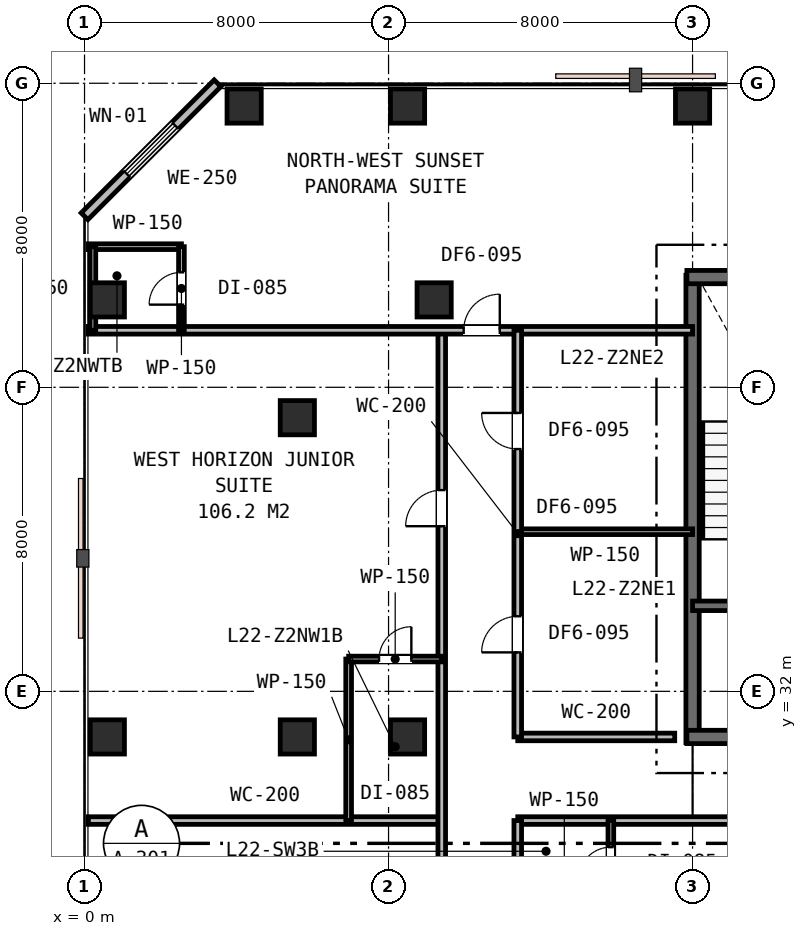
"""IFC4 building model, lengths in metres.
Left out: names, types, materials, properties, quantities, classifications, styles, units other than length and angle.
Written with IfcOpenShell. Run it as: python <this file> out.ifc"""

import sys

from ifc_helpers import new_model, si_unit, direction, frame, frame_2d, origin, origin_2d, place, context, subcontext, project, spatial, rectangle, extrude, element, fill, save


model = new_model("IFC4")
c1 = context("Model", 3, precision=1e-05, world=origin(), true_north=direction((0.0, 1.0)))
c2 = subcontext(c1, "Body", "Model", "MODEL_VIEW")
j1 = project(units=[si_unit("LENGTHUNIT", "METRE"), si_unit("PLANEANGLEUNIT", "RADIAN")], contexts=[c1])
p1 = place(None, origin())
s1 = spatial("IfcSite", under=j1, at=p1, CompositionType="ELEMENT")
p2 = place(p1, origin())
s2 = spatial("IfcBuilding", under=s1, at=p2, CompositionType="ELEMENT")
p3 = place(p2, frame((0.0, 0.0, 90.0)))
s3 = spatial("IfcBuildingStorey", under=s2, at=p3, CompositionType="ELEMENT", Elevation=90.0)
p4 = place(p3, frame((16.0, 30.65, 0.0), z_axis=(0.0, 0.0, 1.0), x_axis=(0.0, 1.0, 0.0)))
e1 = element("IfcWall", 1, at=p4, inside=s3, PredefinedType="SHEAR", context=c2, shape_type="SweptSolid", body=[
    extrude(rectangle(XDim=12.3, YDim=0.35, at=frame_2d((6.15, 0.0))), origin(), (0.0, 0.0, 1.0), 3.6),
])
p5 = place(p3, frame((15.85, 42.9, 0.0), z_axis=(0.0, 0.0, 1.0), x_axis=(1.0, 0.0, 0.0)))
e2 = element("IfcWall", 2, at=p5, inside=s3, PredefinedType="SHEAR", context=c2, shape_type="SweptSolid", body=[
    extrude(rectangle(XDim=24.3, YDim=0.35, at=frame_2d((12.15, 0.0))), origin(), (0.0, 0.0, 1.0), 3.6),
])
p6 = place(p3, frame((15.85, 30.8, 0.0), z_axis=(0.0, 0.0, 1.0), x_axis=(1.0, 0.0, 0.0)))
e3 = element("IfcWall", 3, at=p6, inside=s3, PredefinedType="SHEAR", context=c2, shape_type="SweptSolid", body=[
    extrude(rectangle(XDim=11.2, YDim=0.35, at=frame_2d((5.6, 0.0))), origin(), (0.0, 0.0, 1.0), 3.6),
])
p7 = place(p6, frame((2.45, 0.0, 0.0)))
e4 = element("IfcOpeningElement", 4, at=p7, cuts=e3, PredefinedType="OPENING", context=c2, shape_type="SweptSolid", body=[
    extrude(rectangle(XDim=1.1, YDim=2.15, at=frame_2d((0.55, 1.075))), frame((0.0, 0.185, 0.0), z_axis=(0.0, -1.0, 0.0), x_axis=(1.0, 0.0, 0.0)), (0.0, 0.0, 1.0), 0.37),
])
p8 = place(p3, frame((16.0, 34.25, 0.0), z_axis=(0.0, 0.0, 1.0), x_axis=(1.0, 0.0, 0.0)))
e5 = element("IfcWall", 5, at=p8, inside=s3, PredefinedType="SHEAR", context=c2, shape_type="SweptSolid", body=[
    extrude(rectangle(XDim=6.05, YDim=0.25, at=frame_2d((3.025, 0.0))), origin(), (0.0, 0.0, 1.0), 3.6),
])
p9 = place(p8, frame((1.25, 0.0, 0.0)))
e6 = element("IfcOpeningElement", 6, at=p9, cuts=e5, PredefinedType="OPENING", context=c2, shape_type="SweptSolid", body=[
    extrude(rectangle(XDim=1.0, YDim=2.15, at=frame_2d((0.5, 1.075))), frame((0.0, 0.135, 0.0), z_axis=(0.0, -1.0, 0.0), x_axis=(1.0, 0.0, 0.0)), (0.0, 0.0, 1.0), 0.27),
])
p10 = place(p8, frame((4.2, 0.0, 0.0)))
e7 = element("IfcOpeningElement", 7, at=p10, cuts=e5, PredefinedType="OPENING", context=c2, shape_type="SweptSolid", body=[
    extrude(rectangle(XDim=1.1, YDim=2.15, at=frame_2d((0.55, 1.075))), frame((0.0, 0.135, 0.0), z_axis=(0.0, -1.0, 0.0), x_axis=(1.0, 0.0, 0.0)), (0.0, 0.0, 1.0), 0.27),
])
for number, where, z_axis, x_axis in (
    (8, (5.6, 30.8, 0.0), (0.0, 0.0, 1.0), (1.0, 0.0, 0.0)),
    (9, (5.6, 39.2, 0.0), (0.0, 0.0, 1.0), (1.0, 0.0, 0.0)),
    (10, (8.5, 30.8, 0.0), (0.0, 0.0, 1.0), (1.0, 0.0, 0.0)),
    (11, (9.2, 42.3, 0.0), (0.0, 0.0, 1.0), (1.0, 0.0, 0.0)),
    (12, (0.6, 30.8, 0.0), (0.0, 0.0, 1.0), (1.0, 0.0, 0.0)),
    (13, (0.6, 42.3, 0.0), (0.0, 0.0, 1.0), (1.0, 0.0, 0.0)),
    (14, (4.2, 47.4, 0.0), (0.0, 0.0, 1.0), (1.0, 0.0, 0.0)),
    (15, (8.5, 47.4, 0.0), (0.0, 0.0, 1.0), (1.0, 0.0, 0.0)),
    (16, (16.0, 47.4, 0.0), (0.0, 0.0, 1.0), (1.0, 0.0, 0.0)),
):
    element("IfcColumn", number, at=place(p3, frame(where, z_axis=z_axis, x_axis=x_axis)), inside=s3, PredefinedType="COLUMN", context=c2, shape_type="SweptSolid", body=[
        extrude(rectangle(XDim=0.9, YDim=0.9, at=origin_2d()), origin(), (0.0, 0.0, 1.0), 3.6),
    ])
p11 = place(p3, frame((3.5, 48.0, 0.0), z_axis=(0.0, 0.0, 1.0), x_axis=(-0.707106781187, -0.707106781187, 0.0)))
e17 = element("IfcWall", 17, at=p11, inside=s3, PredefinedType="STANDARD", context=c2, shape_type="SweptSolid", body=[
    extrude(rectangle(XDim=4.95, YDim=0.25, at=frame_2d((2.475, 0.0))), origin(), (0.0, 0.0, 1.0), 3.33),
])
p12 = place(p11, frame((1.575, 0.0, 0.75)))
e18 = element("IfcOpeningElement", 18, at=p12, cuts=e17, PredefinedType="OPENING", context=c2, shape_type="SweptSolid", body=[
    extrude(rectangle(XDim=1.8, YDim=1.85, at=frame_2d((0.9, 0.925))), frame((0.0, 0.135, 0.0), z_axis=(0.0, -1.0, 0.0), x_axis=(1.0, 0.0, 0.0)), (0.0, 0.0, 1.0), 0.27),
])
p13 = place(p3, frame((0.1, 28.6, 0.0), z_axis=(0.0, 0.0, 1.0), x_axis=(1.0, 0.0, 0.0)))
e19 = element("IfcWall", 19, at=p13, inside=s3, PredefinedType="PARTITIONING", context=c2, shape_type="SweptSolid", body=[
    extrude(rectangle(XDim=9.3, YDim=0.2, at=frame_2d((4.65, 0.0))), origin(), (0.0, 0.0, 1.0), 2.83),
])
p14 = place(p3, frame((11.4, 28.6, 0.0), z_axis=(0.0, 0.0, 1.0), x_axis=(1.0, 0.0, 0.0)))
e20 = element("IfcWall", 20, at=p14, inside=s3, PredefinedType="PARTITIONING", context=c2, shape_type="SweptSolid", body=[
    extrude(rectangle(XDim=32.8, YDim=0.2, at=frame_2d((16.4, 0.0))), origin(), (0.0, 0.0, 1.0), 2.83),
])
p15 = place(p14, frame((14.7, 0.0, 0.0)))
e21 = element("IfcOpeningElement", 21, at=p15, cuts=e20, PredefinedType="OPENING", context=c2, shape_type="SweptSolid", body=[
    extrude(rectangle(XDim=0.95, YDim=2.15, at=frame_2d((0.475, 1.075))), frame((0.0, 0.11, 0.0), z_axis=(0.0, -1.0, 0.0), x_axis=(1.0, 0.0, 0.0)), (0.0, 0.0, 1.0), 0.22),
])
p16 = place(p14, frame((22.475, 0.0, 0.0)))
e22 = element("IfcOpeningElement", 22, at=p16, cuts=e20, PredefinedType="OPENING", context=c2, shape_type="SweptSolid", body=[
    extrude(rectangle(XDim=0.95, YDim=2.15, at=frame_2d((0.475, 1.075))), frame((0.0, 0.11, 0.0), z_axis=(0.0, -1.0, 0.0), x_axis=(1.0, 0.0, 0.0)), (0.0, 0.0, 1.0), 0.22),
])
p17 = place(p14, frame((28.985, 0.0, 0.0)))
e23 = element("IfcOpeningElement", 23, at=p17, cuts=e20, PredefinedType="OPENING", context=c2, shape_type="SweptSolid", body=[
    extrude(rectangle(XDim=0.95, YDim=2.15, at=frame_2d((0.475, 1.075))), frame((0.0, 0.11, 0.0), z_axis=(0.0, -1.0, 0.0), x_axis=(1.0, 0.0, 0.0)), (0.0, 0.0, 1.0), 0.22),
])
p18 = place(p3, frame((11.4, 30.8, 0.0), z_axis=(0.0, 0.0, 1.0), x_axis=(1.0, 0.0, 0.0)))
e24 = element("IfcWall", 24, at=p18, inside=s3, PredefinedType="PARTITIONING", context=c2, shape_type="SweptSolid", body=[
    extrude(rectangle(XDim=4.13, YDim=0.2, at=frame_2d((2.065, 0.0))), origin(), (0.0, 0.0, 1.0), 2.83),
])
p19 = place(p3, frame((9.4, 10.6, 0.0), z_axis=(0.0, 0.0, 1.0), x_axis=(0.0, 1.0, 0.0)))
e25 = element("IfcWall", 25, at=p19, inside=s3, PredefinedType="PARTITIONING", context=c2, shape_type="SweptSolid", body=[
    extrude(rectangle(XDim=30.9, YDim=0.2, at=frame_2d((15.45, 0.0))), origin(), (0.0, 0.0, 1.0), 2.83),
])
p20 = place(p19, frame((8.679, 0.0, 0.0)))
e26 = element("IfcOpeningElement", 26, at=p20, cuts=e25, PredefinedType="OPENING", context=c2, shape_type="SweptSolid", body=[
    extrude(rectangle(XDim=0.95, YDim=2.15, at=frame_2d((0.475, 1.075))), frame((0.0, 0.11, 0.0), z_axis=(0.0, -1.0, 0.0), x_axis=(1.0, 0.0, 0.0)), (0.0, 0.0, 1.0), 0.22),
])
p21 = place(p19, frame((14.68, 0.0, 0.0)))
e27 = element("IfcOpeningElement", 27, at=p21, cuts=e25, PredefinedType="OPENING", context=c2, shape_type="SweptSolid", body=[
    extrude(rectangle(XDim=0.95, YDim=2.15, at=frame_2d((0.475, 1.075))), frame((0.0, 0.11, 0.0), z_axis=(0.0, -1.0, 0.0), x_axis=(1.0, 0.0, 0.0)), (0.0, 0.0, 1.0), 0.22),
])
p22 = place(p19, frame((4.273, 0.0, 0.0)))
e28 = element("IfcOpeningElement", 28, at=p22, cuts=e25, PredefinedType="OPENING", context=c2, shape_type="SweptSolid", body=[
    extrude(rectangle(XDim=0.95, YDim=2.15, at=frame_2d((0.475, 1.075))), frame((0.0, 0.11, 0.0), z_axis=(0.0, -1.0, 0.0), x_axis=(1.0, 0.0, 0.0)), (0.0, 0.0, 1.0), 0.22),
])
p23 = place(p19, frame((25.745, 0.0, 0.0)))
e29 = element("IfcOpeningElement", 29, at=p23, cuts=e25, PredefinedType="OPENING", context=c2, shape_type="SweptSolid", body=[
    extrude(rectangle(XDim=0.95, YDim=2.15, at=frame_2d((0.475, 1.075))), frame((0.0, 0.11, 0.0), z_axis=(0.0, -1.0, 0.0), x_axis=(1.0, 0.0, 0.0)), (0.0, 0.0, 1.0), 0.22),
])
p24 = place(p3, frame((0.1, 41.5, 0.0), z_axis=(0.0, 0.0, 1.0), x_axis=(1.0, 0.0, 0.0)))
e30 = element("IfcWall", 30, at=p24, inside=s3, PredefinedType="PARTITIONING", context=c2, shape_type="SweptSolid", body=[
    extrude(rectangle(XDim=15.9, YDim=0.2, at=frame_2d((7.95, 0.0))), origin(), (0.0, 0.0, 1.0), 2.83),
])
p25 = place(p24, frame((9.877, 0.0, 0.0)))
e31 = element("IfcOpeningElement", 31, at=p25, cuts=e30, PredefinedType="OPENING", context=c2, shape_type="SweptSolid", body=[
    extrude(rectangle(XDim=0.95, YDim=2.15, at=frame_2d((0.475, 1.075))), frame((0.0, 0.11, 0.0), z_axis=(0.0, -1.0, 0.0), x_axis=(1.0, 0.0, 0.0)), (0.0, 0.0, 1.0), 0.22),
])
p26 = place(p3, frame((0.1, 43.7, 0.0), z_axis=(0.0, 0.0, 1.0), x_axis=(1.0, 0.0, 0.0)))
e32 = element("IfcWall", 32, at=p26, inside=s3, PredefinedType="PARTITIONING", context=c2, shape_type="SweptSolid", body=[
    extrude(rectangle(XDim=2.45, YDim=0.15, at=frame_2d((1.225, 0.0))), origin(), (0.0, 0.0, 1.0), 3.33),
])
p27 = place(p3, frame((2.55, 41.5, 0.0), z_axis=(0.0, 0.0, 1.0), x_axis=(0.0, 1.0, 0.0)))
e33 = element("IfcWall", 33, at=p27, inside=s3, PredefinedType="PARTITIONING", context=c2, shape_type="SweptSolid", body=[
    extrude(rectangle(XDim=2.2, YDim=0.15, at=frame_2d((1.1, 0.0))), origin(), (0.0, 0.0, 1.0), 2.83),
])
p28 = place(p27, frame((0.675, 0.0, 0.0)))
e34 = element("IfcOpeningElement", 34, at=p28, cuts=e33, PredefinedType="OPENING", context=c2, shape_type="SweptSolid", body=[
    extrude(rectangle(XDim=0.85, YDim=2.15, at=frame_2d((0.425, 1.075))), frame((0.0, 0.085, 0.0), z_axis=(0.0, -1.0, 0.0), x_axis=(1.0, 0.0, 0.0)), (0.0, 0.0, 1.0), 0.17),
])
p29 = place(p3, frame((0.22, 41.5, 0.0), z_axis=(0.0, 0.0, 1.0), x_axis=(0.0, 1.0, 0.0)))
e35 = element("IfcWall", 35, at=p29, inside=s3, PredefinedType="PARTITIONING", context=c2, shape_type="SweptSolid", body=[
    extrude(rectangle(XDim=2.2, YDim=0.15, at=frame_2d((1.1, 0.0))), origin(), (0.0, 0.0, 1.0), 2.83),
])
p30 = place(p3, frame((6.95, 28.6, 0.0), z_axis=(0.0, 0.0, 1.0), x_axis=(0.0, 1.0, 0.0)))
e36 = element("IfcWall", 36, at=p30, inside=s3, PredefinedType="PARTITIONING", context=c2, shape_type="SweptSolid", body=[
    extrude(rectangle(XDim=4.25, YDim=0.15, at=frame_2d((2.125, 0.0))), origin(), (0.0, 0.0, 1.0), 2.83),
])
p31 = place(p3, frame((6.95, 32.85, 0.0), z_axis=(0.0, 0.0, 1.0), x_axis=(1.0, 0.0, 0.0)))
e37 = element("IfcWall", 37, at=p31, inside=s3, PredefinedType="PARTITIONING", context=c2, shape_type="SweptSolid", body=[
    extrude(rectangle(XDim=2.45, YDim=0.15, at=frame_2d((1.225, 0.0))), origin(), (0.0, 0.0, 1.0), 2.83),
])
p32 = place(p31, frame((0.8, 0.0, 0.0)))
e38 = element("IfcOpeningElement", 38, at=p32, cuts=e37, PredefinedType="OPENING", context=c2, shape_type="SweptSolid", body=[
    extrude(rectangle(XDim=0.85, YDim=2.15, at=frame_2d((0.425, 1.075))), frame((0.0, 0.085, 0.0), z_axis=(0.0, -1.0, 0.0), x_axis=(1.0, 0.0, 0.0)), (0.0, 0.0, 1.0), 0.17),
])
p33 = place(p3, frame((11.4, 36.2, 0.0), z_axis=(0.0, 0.0, 1.0), x_axis=(1.0, 0.0, 0.0)))
e39 = element("IfcWall", 39, at=p33, inside=s3, PredefinedType="PARTITIONING", context=c2, shape_type="SweptSolid", body=[
    extrude(rectangle(XDim=4.6, YDim=0.15, at=frame_2d((2.3, 0.0))), origin(), (0.0, 0.0, 1.0), 3.33),
])
p34 = place(p3, frame((11.4, 30.8, 0.0), z_axis=(0.0, 0.0, 1.0), x_axis=(0.0, 1.0, 0.0)))
e40 = element("IfcWall", 40, at=p34, inside=s3, PredefinedType="PARTITIONING", context=c2, shape_type="SweptSolid", body=[
    extrude(rectangle(XDim=10.7, YDim=0.2, at=frame_2d((5.35, 0.0))), origin(), (0.0, 0.0, 1.0), 2.83),
])
p35 = place(p34, frame((2.225, 0.0, 0.0)))
e41 = element("IfcOpeningElement", 41, at=p35, cuts=e40, PredefinedType="OPENING", context=c2, shape_type="SweptSolid", body=[
    extrude(rectangle(XDim=0.95, YDim=2.15, at=frame_2d((0.475, 1.075))), frame((0.0, 0.11, 0.0), z_axis=(0.0, -1.0, 0.0), x_axis=(1.0, 0.0, 0.0)), (0.0, 0.0, 1.0), 0.22),
])
p36 = place(p34, frame((7.575, 0.0, 0.0)))
e42 = element("IfcOpeningElement", 42, at=p36, cuts=e40, PredefinedType="OPENING", context=c2, shape_type="SweptSolid", body=[
    extrude(rectangle(XDim=0.95, YDim=2.15, at=frame_2d((0.475, 1.075))), frame((0.0, 0.11, 0.0), z_axis=(0.0, -1.0, 0.0), x_axis=(1.0, 0.0, 0.0)), (0.0, 0.0, 1.0), 0.22),
])
p37 = place(p3, frame((11.4, 10.6, 0.0), z_axis=(0.0, 0.0, 1.0), x_axis=(0.0, 1.0, 0.0)))
e43 = element("IfcWall", 43, at=p37, inside=s3, PredefinedType="PARTITIONING", context=c2, shape_type="SweptSolid", body=[
    extrude(rectangle(XDim=18.0, YDim=0.2, at=frame_2d((9.0, 0.0))), origin(), (0.0, 0.0, 1.0), 2.83),
])
p38 = place(p37, frame((1.29, 0.0, 0.0)))
e44 = element("IfcOpeningElement", 44, at=p38, cuts=e43, PredefinedType="OPENING", context=c2, shape_type="SweptSolid", body=[
    extrude(rectangle(XDim=0.95, YDim=2.15, at=frame_2d((0.475, 1.075))), frame((0.0, 0.11, 0.0), z_axis=(0.0, -1.0, 0.0), x_axis=(1.0, 0.0, 0.0)), (0.0, 0.0, 1.0), 0.22),
])
p39 = place(p37, frame((7.29, 0.0, 0.0)))
e45 = element("IfcOpeningElement", 45, at=p39, cuts=e43, PredefinedType="OPENING", context=c2, shape_type="SweptSolid", body=[
    extrude(rectangle(XDim=0.95, YDim=2.15, at=frame_2d((0.475, 1.075))), frame((0.0, 0.11, 0.0), z_axis=(0.0, -1.0, 0.0), x_axis=(1.0, 0.0, 0.0)), (0.0, 0.0, 1.0), 0.22),
])
p40 = place(p37, frame((13.29, 0.0, 0.0)))
e46 = element("IfcOpeningElement", 46, at=p40, cuts=e43, PredefinedType="OPENING", context=c2, shape_type="SweptSolid", body=[
    extrude(rectangle(XDim=0.95, YDim=2.15, at=frame_2d((0.475, 1.075))), frame((0.0, 0.11, 0.0), z_axis=(0.0, -1.0, 0.0), x_axis=(1.0, 0.0, 0.0)), (0.0, 0.0, 1.0), 0.22),
])
p41 = place(p3, frame((13.85, 26.35, 0.0), z_axis=(0.0, 0.0, 1.0), x_axis=(0.0, 1.0, 0.0)))
e47 = element("IfcWall", 47, at=p41, inside=s3, PredefinedType="PARTITIONING", context=c2, shape_type="SweptSolid", body=[
    extrude(rectangle(XDim=2.25, YDim=0.15, at=frame_2d((1.125, 0.0))), origin(), (0.0, 0.0, 1.0), 3.33),
])
p42 = place(p41, frame((0.7, 0.0, 0.0)))
e48 = element("IfcOpeningElement", 48, at=p42, cuts=e47, PredefinedType="OPENING", context=c2, shape_type="SweptSolid", body=[
    extrude(rectangle(XDim=0.85, YDim=2.15, at=frame_2d((0.425, 1.075))), frame((0.0, 0.085, 0.0), z_axis=(0.0, -1.0, 0.0), x_axis=(1.0, 0.0, 0.0)), (0.0, 0.0, 1.0), 0.17),
])
p43 = place(p12, origin())
e49 = element("IfcWindow", 49, at=p43, inside=s3, PartitioningType="SINGLE_PANEL", PredefinedType="WINDOW", context=c2, shape_type="SweptSolid", body=[
    extrude(rectangle(XDim=1.8, YDim=1.85, at=frame_2d((0.9, 0.925))), frame((0.0, 0.03, 0.0), z_axis=(0.0, -1.0, 0.0), x_axis=(1.0, 0.0, 0.0)), (0.0, 0.0, 1.0), 0.06),
])
fill(e18, e49)
p44 = place(p25, origin())
e50 = element("IfcDoor", 50, at=p44, inside=s3, OperationType="SINGLE_SWING_RIGHT", PredefinedType="DOOR", context=c2, shape_type="SweptSolid", body=[
    extrude(rectangle(XDim=0.95, YDim=2.15, at=frame_2d((0.475, 1.075))), frame((0.0, 0.025, 0.0), z_axis=(0.0, -1.0, 0.0), x_axis=(1.0, 0.0, 0.0)), (0.0, 0.0, 1.0), 0.05),
])
fill(e31, e50)
p45 = place(p28, origin())
e51 = element("IfcDoor", 51, at=p45, inside=s3, OperationType="SINGLE_SWING_LEFT", PredefinedType="DOOR", context=c2, shape_type="SweptSolid", body=[
    extrude(rectangle(XDim=0.85, YDim=2.15, at=frame_2d((0.425, 1.075))), frame((0.0, 0.025, 0.0), z_axis=(0.0, -1.0, 0.0), x_axis=(1.0, 0.0, 0.0)), (0.0, 0.0, 1.0), 0.05),
])
fill(e34, e51)
p46 = place(p23, origin())
e52 = element("IfcDoor", 52, at=p46, inside=s3, OperationType="SINGLE_SWING_LEFT", PredefinedType="DOOR", context=c2, shape_type="SweptSolid", body=[
    extrude(rectangle(XDim=0.95, YDim=2.15, at=frame_2d((0.475, 1.075))), frame((0.0, 0.025, 0.0), z_axis=(0.0, -1.0, 0.0), x_axis=(1.0, 0.0, 0.0)), (0.0, 0.0, 1.0), 0.05),
])
fill(e29, e52)
p47 = place(p32, origin())
e53 = element("IfcDoor", 53, at=p47, inside=s3, OperationType="SINGLE_SWING_RIGHT", PredefinedType="DOOR", context=c2, shape_type="SweptSolid", body=[
    extrude(rectangle(XDim=0.85, YDim=2.15, at=frame_2d((0.425, 1.075))), frame((0.0, 0.025, 0.0), z_axis=(0.0, -1.0, 0.0), x_axis=(1.0, 0.0, 0.0)), (0.0, 0.0, 1.0), 0.05),
])
fill(e38, e53)
p48 = place(p35, origin())
e54 = element("IfcDoor", 54, at=p48, inside=s3, OperationType="SINGLE_SWING_LEFT", PredefinedType="DOOR", context=c2, shape_type="SweptSolid", body=[
    extrude(rectangle(XDim=0.95, YDim=2.15, at=frame_2d((0.475, 1.075))), frame((0.0, 0.025, 0.0), z_axis=(0.0, -1.0, 0.0), x_axis=(1.0, 0.0, 0.0)), (0.0, 0.0, 1.0), 0.05),
])
fill(e41, e54)
p49 = place(p36, origin())
e55 = element("IfcDoor", 55, at=p49, inside=s3, OperationType="SINGLE_SWING_RIGHT", PredefinedType="DOOR", context=c2, shape_type="SweptSolid", body=[
    extrude(rectangle(XDim=0.95, YDim=2.15, at=frame_2d((0.475, 1.075))), frame((0.0, 0.025, 0.0), z_axis=(0.0, -1.0, 0.0), x_axis=(1.0, 0.0, 0.0)), (0.0, 0.0, 1.0), 0.05),
])
fill(e42, e55)
p50 = place(p42, origin())
e56 = element("IfcDoor", 56, at=p50, inside=s3, OperationType="SINGLE_SWING_LEFT", PredefinedType="DOOR", context=c2, shape_type="SweptSolid", body=[
    extrude(rectangle(XDim=0.85, YDim=2.15, at=frame_2d((0.425, 1.075))), frame((0.0, 0.025, 0.0), z_axis=(0.0, -1.0, 0.0), x_axis=(1.0, 0.0, 0.0)), (0.0, 0.0, 1.0), 0.05),
])
fill(e48, e56)
save(model, sys.argv[1])
